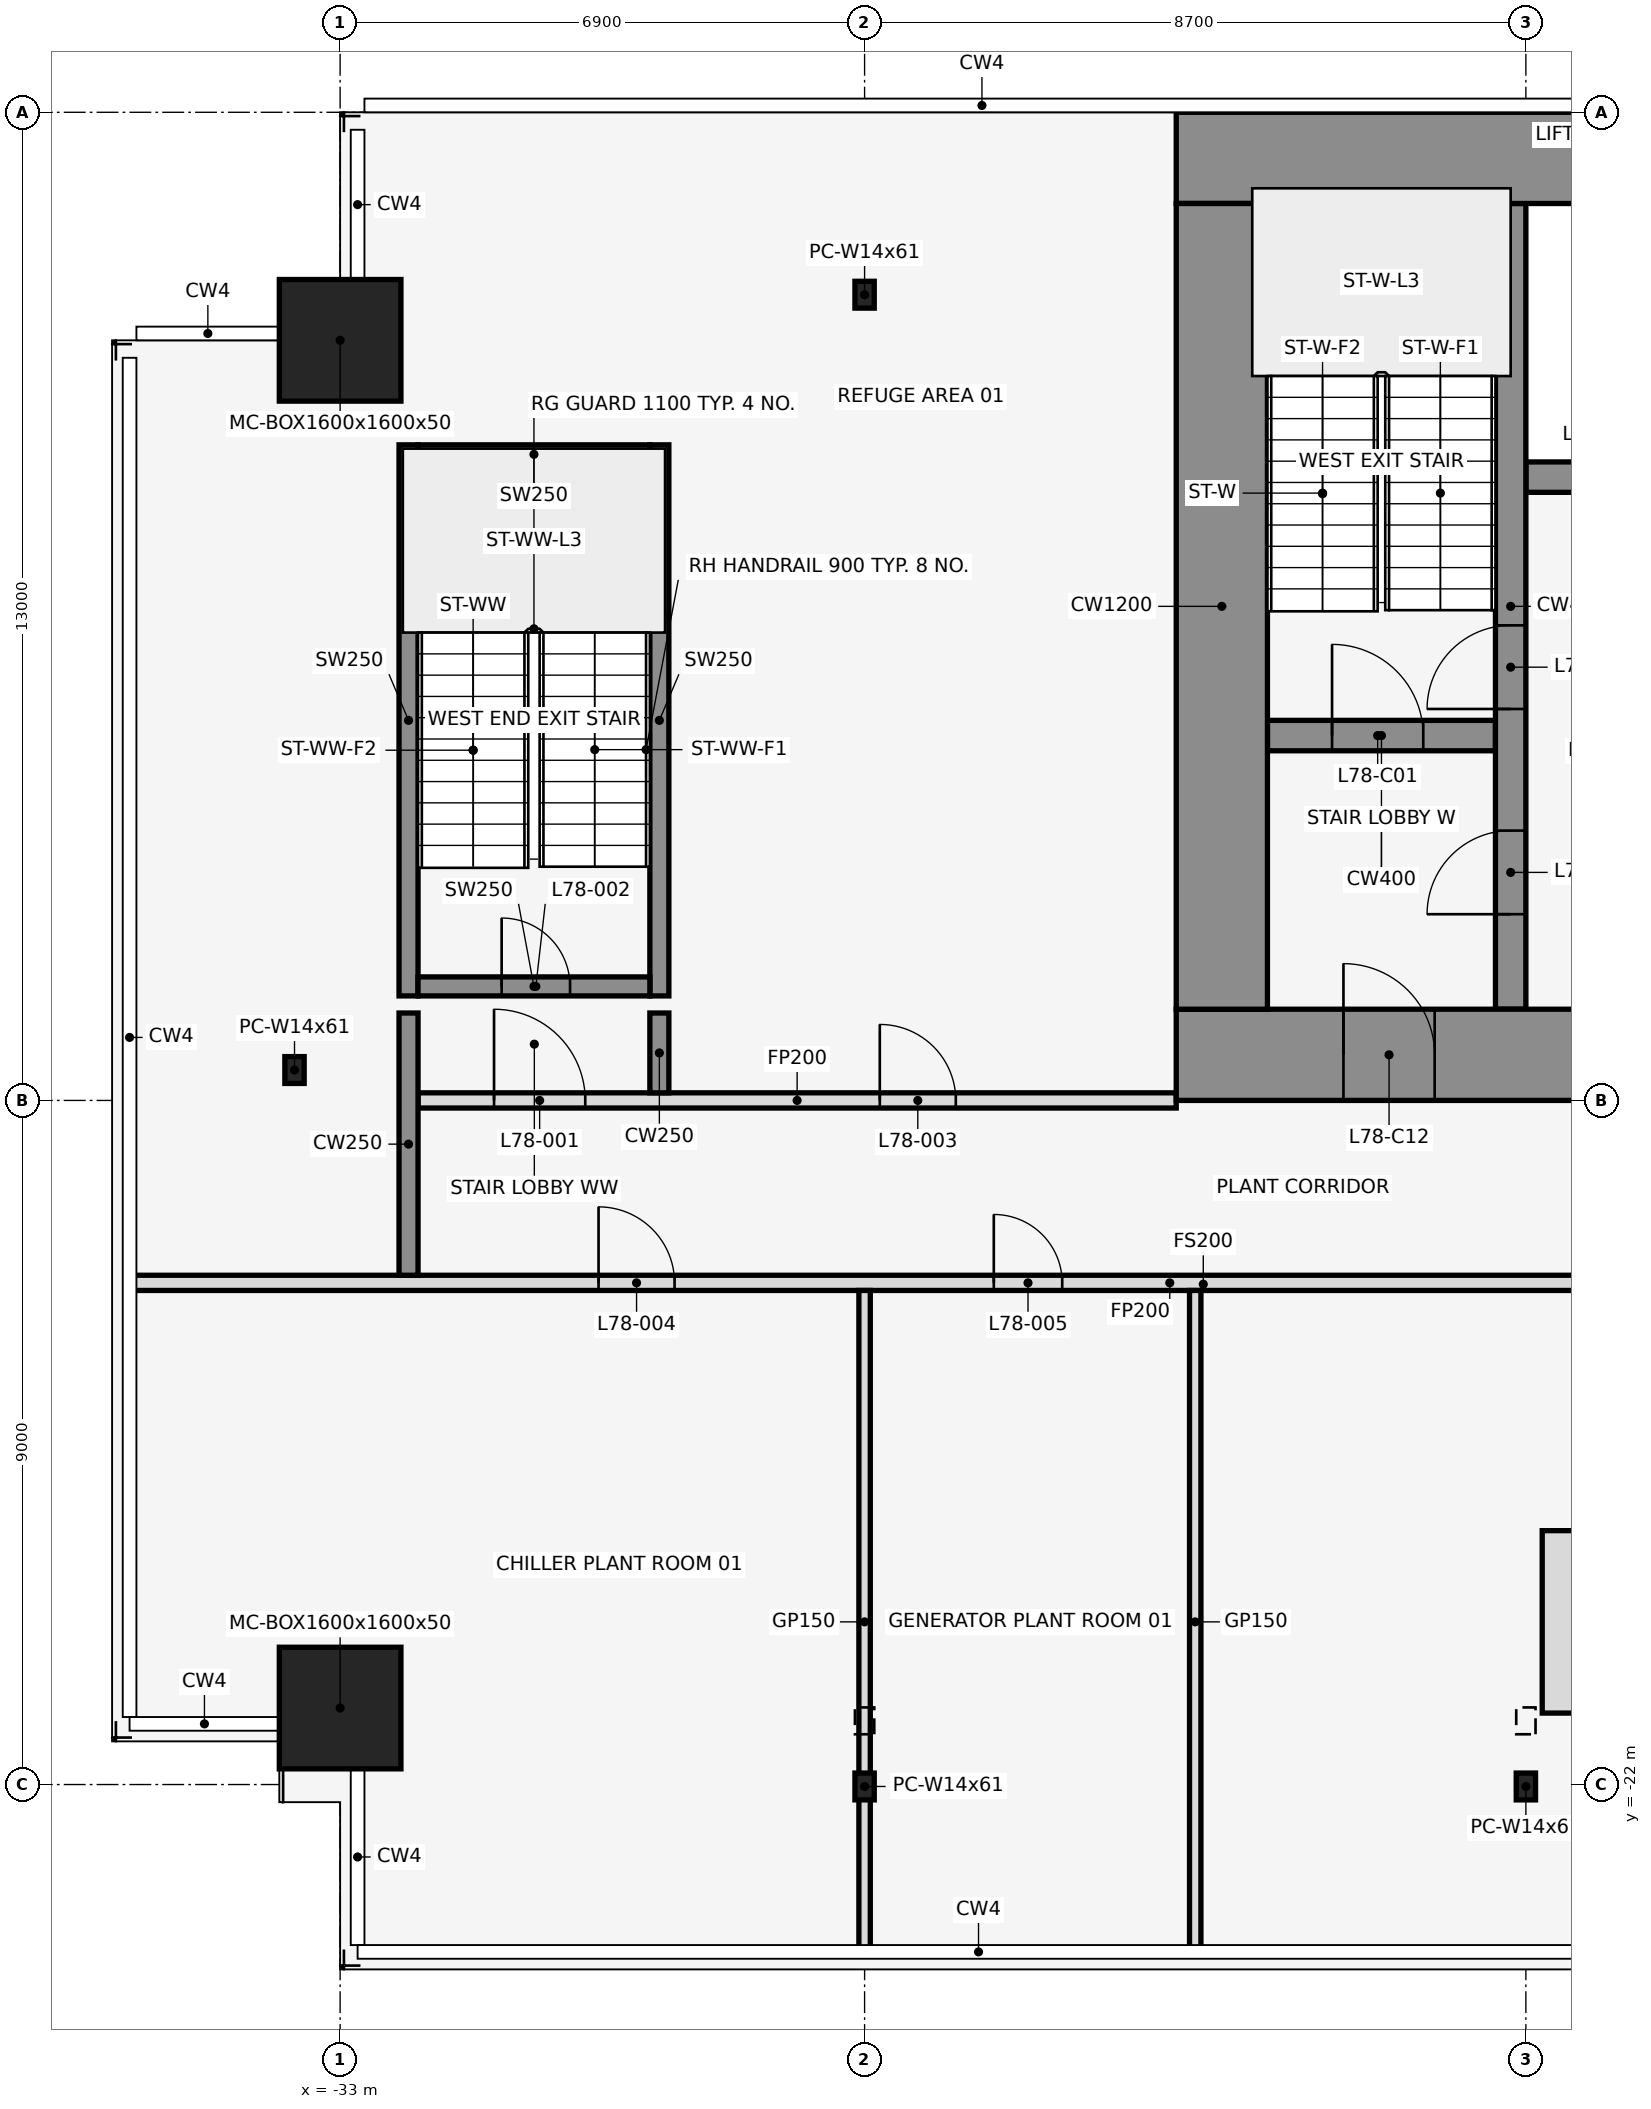
"""IFC4 building model, lengths in metres.
Left out: names, types, materials, properties, quantities, classifications, styles, units other than length and angle.
Written with IfcOpenShell. Run it as: python <this file> out.ifc"""

import sys

from ifc_helpers import new_model, si_unit, direction, frame, frame_2d, origin, origin_2d, place, context, subcontext, project, spatial, rectangle, hollow_rectangle, i_section, extrude, element, fill, save


model = new_model("IFC4")
c1 = context("Model", 3, precision=1e-05, world=origin(), true_north=direction((0.0, 1.0)))
c2 = subcontext(c1, "Body", "Model", "MODEL_VIEW")
j1 = project(units=[si_unit("LENGTHUNIT", "METRE"), si_unit("PLANEANGLEUNIT", "RADIAN")], contexts=[c1])
p1 = place(None, origin())
s1 = spatial("IfcSite", under=j1, at=p1, CompositionType="ELEMENT")
p2 = place(p1, origin())
s2 = spatial("IfcBuilding", under=s1, at=p2, CompositionType="ELEMENT")
p3 = place(p2, frame((0.0, 0.0, 347.9)))
s3 = spatial("IfcBuildingStorey", under=s2, at=p3, CompositionType="ELEMENT", Elevation=347.9)
for number, where, z_axis, x_axis in (
    (1, (-33.0, -20.994, 0.0), (0.0, 0.0, 1.0), (1.0, 0.0, 0.0)),
    (2, (-33.0, -3.0, 0.0), (0.0, 0.0, 1.0), (1.0, 0.0, 0.0)),
):
    element("IfcColumn", number, at=place(p3, frame(where, z_axis=z_axis, x_axis=x_axis)), inside=s3, PredefinedType="COLUMN", context=c2, shape_type="SweptSolid", body=[
        extrude(hollow_rectangle(XDim=1.6, YDim=1.6, WallThickness=0.05, at=origin_2d()), origin(), (0.0, 0.0, 1.0), 4.5),
    ])
p4 = place(p3, frame((-26.1, -22.025, 0.034), z_axis=(0.0, 0.191154699822, 0.981559922132), x_axis=(-1.0, 0.0, 0.0)))
e3 = element("IfcColumn", 3, at=p4, inside=s3, PredefinedType="COLUMN", context=c2, shape_type="SweptSolid", body=[
    extrude(i_section(OverallWidth=0.254, OverallDepth=0.353, WebThickness=0.01, FlangeThickness=0.016, at=origin_2d()), origin(), (0.0, 0.0, 1.0), 4.516),
])
p5 = place(p3, frame((-26.1, -2.4, 0.0), z_axis=(0.0, 0.0, 1.0), x_axis=(1.0, 0.0, 0.0)))
e4 = element("IfcColumn", 4, at=p5, inside=s3, PredefinedType="COLUMN", context=c2, shape_type="SweptSolid", body=[
    extrude(i_section(OverallWidth=0.254, OverallDepth=0.353, WebThickness=0.01, FlangeThickness=0.016, at=origin_2d()), origin(), (0.0, 0.0, 1.0), 4.5),
])
p6 = place(p3, frame((-17.4, -22.025, 0.034), z_axis=(0.0, 0.191154699822, 0.981559922132), x_axis=(-1.0, 0.0, 0.0)))
e5 = element("IfcColumn", 5, at=p6, inside=s3, PredefinedType="COLUMN", context=c2, shape_type="SweptSolid", body=[
    extrude(i_section(OverallWidth=0.254, OverallDepth=0.353, WebThickness=0.01, FlangeThickness=0.016, at=origin_2d()), origin(), (0.0, 0.0, 1.0), 4.516),
])
p7 = place(p3, frame((-33.6, -12.6, 0.0), z_axis=(0.0, 0.0, 1.0), x_axis=(1.0, 0.0, 0.0)))
e6 = element("IfcColumn", 6, at=p7, inside=s3, PredefinedType="COLUMN", context=c2, shape_type="SweptSolid", body=[
    extrude(i_section(OverallWidth=0.254, OverallDepth=0.353, WebThickness=0.01, FlangeThickness=0.016, at=origin_2d()), origin(), (0.0, 0.0, 1.0), 4.5),
])
p8 = place(p3, frame((-15.185, -19.86, 0.0), z_axis=(0.0, 0.0, 1.0), x_axis=(1.0, 0.0, 0.0)))
e7 = element("IfcWall", 7, at=p8, inside=s3, PredefinedType="USERDEFINED", context=c2, shape_type="SweptSolid", body=[
    extrude(rectangle(XDim=4.0, YDim=2.4, at=origin_2d()), origin(), (0.0, 0.0, 1.0), 0.2),
])
for number, where, z_axis, x_axis in (
    (8, (-32.1, -11.625, 0.0), (0.0, 0.0, 1.0), (0.0, 1.0, 0.0)),
    (9, (-28.8, -11.625, 0.0), (0.0, 0.0, 1.0), (0.0, 1.0, 0.0)),
):
    element("IfcWall", number, at=place(p3, frame(where, z_axis=z_axis, x_axis=x_axis)), inside=s3, PredefinedType="SHEAR", context=c2, shape_type="SweptSolid", body=[
        extrude(rectangle(XDim=7.25, YDim=0.25, at=frame_2d((3.625, 0.0))), origin(), (0.0, 0.0, 1.0), 4.5),
    ])
p9 = place(p3, frame((-31.975, -11.5, 0.0), z_axis=(0.0, 0.0, 1.0), x_axis=(1.0, 0.0, 0.0)))
e10 = element("IfcWall", 10, at=p9, inside=s3, PredefinedType="SHEAR", context=c2, shape_type="SweptSolid", body=[
    extrude(rectangle(XDim=3.05, YDim=0.25, at=frame_2d((1.525, 0.0))), origin(), (0.0, 0.0, 1.0), 4.5),
])
p10 = place(p9, frame((1.1, 0.0, 0.0)))
e11 = element("IfcOpeningElement", 11, at=p10, cuts=e10, PredefinedType="OPENING", context=c2, shape_type="SweptSolid", body=[
    extrude(rectangle(XDim=0.9, YDim=2.1, at=frame_2d((0.45, 1.05))), frame((0.0, 0.137, 0.0), z_axis=(0.0, -1.0, 0.0), x_axis=(1.0, 0.0, 0.0)), (0.0, 0.0, 1.0), 0.274),
])
p11 = place(p3, frame((-31.975, -4.5, 0.0), z_axis=(0.0, 0.0, 1.0), x_axis=(1.0, 0.0, 0.0)))
e12 = element("IfcWall", 12, at=p11, inside=s3, PredefinedType="SHEAR", context=c2, shape_type="SweptSolid", body=[
    extrude(rectangle(XDim=3.05, YDim=0.25, at=frame_2d((1.525, 0.0))), origin(), (0.0, 0.0, 1.0), 4.5),
])
p12 = place(p3, frame((-35.79, -15.4, 0.0), z_axis=(0.0, 0.0, 1.0), x_axis=(1.0, 0.0, 0.0)))
e13 = element("IfcWall", 13, at=p12, inside=s3, PredefinedType="PARTITIONING", context=c2, shape_type="SweptSolid", body=[
    extrude(rectangle(XDim=27.41, YDim=0.2, at=frame_2d((13.705, 0.0))), origin(), (0.0, 0.0, 1.0), 3.368),
])
p13 = place(p12, frame((6.19, 0.0, 0.0)))
e14 = element("IfcOpeningElement", 14, at=p13, cuts=e13, PredefinedType="OPENING", context=c2, shape_type="SweptSolid", body=[
    extrude(rectangle(XDim=1.0, YDim=2.1, at=frame_2d((0.5, 1.05))), frame((0.0, 0.112, 0.0), z_axis=(0.0, -1.0, 0.0), x_axis=(1.0, 0.0, 0.0)), (0.0, 0.0, 1.0), 0.224),
])
p14 = place(p12, frame((11.39, 0.0, 0.0)))
e15 = element("IfcOpeningElement", 15, at=p14, cuts=e13, PredefinedType="OPENING", context=c2, shape_type="SweptSolid", body=[
    extrude(rectangle(XDim=0.9, YDim=2.1, at=frame_2d((0.45, 1.05))), frame((0.0, 0.112, 0.0), z_axis=(0.0, -1.0, 0.0), x_axis=(1.0, 0.0, 0.0)), (0.0, 0.0, 1.0), 0.224),
])
p15 = place(p12, frame((20.04, 0.0, 0.0)))
e16 = element("IfcOpeningElement", 16, at=p15, cuts=e13, PredefinedType="OPENING", context=c2, shape_type="SweptSolid", body=[
    extrude(rectangle(XDim=1.0, YDim=2.1, at=frame_2d((0.5, 1.05))), frame((0.0, 0.112, 0.0), z_axis=(0.0, -1.0, 0.0), x_axis=(1.0, 0.0, 0.0)), (0.0, 0.0, 1.0), 0.224),
])
p16 = place(p3, frame((-31.975, -13.0, 0.0), z_axis=(0.0, 0.0, 1.0), x_axis=(1.0, 0.0, 0.0)))
e17 = element("IfcWall", 17, at=p16, inside=s3, PredefinedType="PARTITIONING", context=c2, shape_type="SweptSolid", body=[
    extrude(rectangle(XDim=9.975, YDim=0.2, at=frame_2d((4.988, 0.0))), origin(), (0.0, 0.0, 1.0), 3.368),
])
p17 = place(p16, frame((1.0, 0.0, 0.0)))
e18 = element("IfcOpeningElement", 18, at=p17, cuts=e17, PredefinedType="OPENING", context=c2, shape_type="SweptSolid", body=[
    extrude(rectangle(XDim=1.2, YDim=2.1, at=frame_2d((0.6, 1.05))), frame((0.0, 0.112, 0.0), z_axis=(0.0, -1.0, 0.0), x_axis=(1.0, 0.0, 0.0)), (0.0, 0.0, 1.0), 0.224),
])
p18 = place(p16, frame((6.075, 0.0, 0.0)))
e19 = element("IfcOpeningElement", 19, at=p18, cuts=e17, PredefinedType="OPENING", context=c2, shape_type="SweptSolid", body=[
    extrude(rectangle(XDim=1.0, YDim=2.1, at=frame_2d((0.5, 1.05))), frame((0.0, 0.112, 0.0), z_axis=(0.0, -1.0, 0.0), x_axis=(1.0, 0.0, 0.0)), (0.0, 0.0, 1.0), 0.224),
])
p19 = place(p3, frame((-32.1, -15.3, 0.0), z_axis=(0.0, 0.0, 1.0), x_axis=(0.0, 1.0, 0.0)))
e20 = element("IfcWall", 20, at=p19, inside=s3, PredefinedType="SHEAR", context=c2, shape_type="SweptSolid", body=[
    extrude(rectangle(XDim=3.45, YDim=0.25, at=frame_2d((1.725, 0.0))), origin(), (0.0, 0.0, 1.0), 4.5),
])
p20 = place(p3, frame((-28.8, -12.9, 0.0), z_axis=(0.0, 0.0, 1.0), x_axis=(0.0, 1.0, 0.0)))
e21 = element("IfcWall", 21, at=p20, inside=s3, PredefinedType="SHEAR", context=c2, shape_type="SweptSolid", body=[
    extrude(rectangle(XDim=1.05, YDim=0.25, at=frame_2d((0.525, 0.0))), origin(), (0.0, 0.0, 1.0), 4.5),
])
for number, where, z_axis, x_axis in (
    (22, (-26.1, -24.22, 0.0), (0.0, 0.0, 1.0), (0.0, 1.0, 0.0)),
    (23, (-21.75, -24.22, 0.0), (0.0, 0.0, 1.0), (0.0, 1.0, 0.0)),
):
    element("IfcWall", number, at=place(p3, frame(where, z_axis=z_axis, x_axis=x_axis)), inside=s3, PredefinedType="PARTITIONING", context=c2, shape_type="SweptSolid", body=[
        extrude(rectangle(XDim=8.72, YDim=0.15, at=frame_2d((4.36, 0.0))), origin(), (0.0, 0.0, 1.0), 3.368),
    ])
p21 = place(p3, frame((-20.8, -8.2, 0.0), z_axis=(0.0, 0.0, 1.0), x_axis=(1.0, 0.0, 0.0)))
e24 = element("IfcWall", 24, at=p21, inside=s3, PredefinedType="SHEAR", context=c2, shape_type="SweptSolid", body=[
    extrude(rectangle(XDim=3.0, YDim=0.4, at=frame_2d((1.5, 0.0))), origin(), (0.0, 0.0, 1.0), 4.5),
])
p22 = place(p21, frame((0.85, 0.0, 0.0)))
e25 = element("IfcOpeningElement", 25, at=p22, cuts=e24, PredefinedType="OPENING", context=c2, shape_type="SweptSolid", body=[
    extrude(rectangle(XDim=1.2, YDim=2.1, at=frame_2d((0.6, 1.05))), frame((0.0, 0.212, 0.0), z_axis=(0.0, -1.0, 0.0), x_axis=(1.0, 0.0, 0.0)), (0.0, 0.0, 1.0), 0.424),
])
p23 = place(p3, frame((-17.4, -4.8, 0.0), z_axis=(0.0, 0.0, 1.0), x_axis=(1.0, 0.0, 0.0)))
e26 = element("IfcWall", 26, at=p23, inside=s3, PredefinedType="SHEAR", context=c2, shape_type="SweptSolid", body=[
    extrude(rectangle(XDim=4.6, YDim=0.4, at=frame_2d((2.3, 0.0))), origin(), (0.0, 0.0, 1.0), 4.5),
])
p24 = place(p23, frame((0.65, 0.0, 0.0)))
e27 = element("IfcOpeningElement", 27, at=p24, cuts=e26, PredefinedType="OPENING", context=c2, shape_type="SweptSolid", body=[
    extrude(rectangle(XDim=1.1, YDim=2.1, at=frame_2d((0.55, 1.05))), frame((0.0, 0.212, 0.0), z_axis=(0.0, -1.0, 0.0), x_axis=(1.0, 0.0, 0.0)), (0.0, 0.0, 1.0), 0.424),
])
p25 = place(p23, frame((2.85, 0.0, 0.0)))
e28 = element("IfcOpeningElement", 28, at=p25, cuts=e26, PredefinedType="OPENING", context=c2, shape_type="SweptSolid", body=[
    extrude(rectangle(XDim=1.1, YDim=2.1, at=frame_2d((0.55, 1.05))), frame((0.0, 0.212, 0.0), z_axis=(0.0, -1.0, 0.0), x_axis=(1.0, 0.0, 0.0)), (0.0, 0.0, 1.0), 0.424),
])
p26 = place(p3, frame((-17.6, -11.8, 0.0), z_axis=(0.0, 0.0, 1.0), x_axis=(0.0, 1.0, 0.0)))
e29 = element("IfcWall", 29, at=p26, inside=s3, PredefinedType="SHEAR", context=c2, shape_type="SweptSolid", body=[
    extrude(rectangle(XDim=10.6, YDim=0.4, at=frame_2d((5.3, 0.0))), origin(), (0.0, 0.0, 1.0), 4.5),
])
p27 = place(p26, frame((1.25, 0.0, 0.0)))
e30 = element("IfcOpeningElement", 30, at=p27, cuts=e29, PredefinedType="OPENING", context=c2, shape_type="SweptSolid", body=[
    extrude(rectangle(XDim=1.1, YDim=2.1, at=frame_2d((0.55, 1.05))), frame((0.0, 0.212, 0.0), z_axis=(0.0, -1.0, 0.0), x_axis=(1.0, 0.0, 0.0)), (0.0, 0.0, 1.0), 0.424),
])
p28 = place(p26, frame((3.95, 0.0, 0.0)))
e31 = element("IfcOpeningElement", 31, at=p28, cuts=e29, PredefinedType="OPENING", context=c2, shape_type="SweptSolid", body=[
    extrude(rectangle(XDim=1.1, YDim=2.1, at=frame_2d((0.55, 1.05))), frame((0.0, 0.212, 0.0), z_axis=(0.0, -1.0, 0.0), x_axis=(1.0, 0.0, 0.0)), (0.0, 0.0, 1.0), 0.424),
])
p29 = place(p3, frame((-22.0, -0.6, 0.0), z_axis=(0.0, 0.0, 1.0), x_axis=(1.0, 0.0, 0.0)))
e32 = element("IfcWall", 32, at=p29, inside=s3, PredefinedType="SHEAR", context=c2, shape_type="SweptSolid", body=[
    extrude(rectangle(XDim=13.7, YDim=1.2, at=frame_2d((6.85, 0.0))), origin(), (0.0, 0.0, 1.0), 4.5),
])
p30 = place(p3, frame((-22.0, -12.4, 0.0), z_axis=(0.0, 0.0, 1.0), x_axis=(1.0, 0.0, 0.0)))
e33 = element("IfcWall", 33, at=p30, inside=s3, PredefinedType="SHEAR", context=c2, shape_type="SweptSolid", body=[
    extrude(rectangle(XDim=13.7, YDim=1.2, at=frame_2d((6.85, 0.0))), origin(), (0.0, 0.0, 1.0), 4.5),
])
p31 = place(p30, frame((2.2, 0.0, 0.0)))
e34 = element("IfcOpeningElement", 34, at=p31, cuts=e33, PredefinedType="OPENING", context=c2, shape_type="SweptSolid", body=[
    extrude(rectangle(XDim=1.2, YDim=2.1, at=frame_2d((0.6, 1.05))), frame((0.0, 0.612, 0.0), z_axis=(0.0, -1.0, 0.0), x_axis=(1.0, 0.0, 0.0)), (0.0, 0.0, 1.0), 1.224),
])
p32 = place(p30, frame((10.75, 0.0, 0.0)))
e35 = element("IfcOpeningElement", 35, at=p32, cuts=e33, PredefinedType="OPENING", context=c2, shape_type="SweptSolid", body=[
    extrude(rectangle(XDim=1.2, YDim=2.1, at=frame_2d((0.6, 1.05))), frame((0.0, 0.612, 0.0), z_axis=(0.0, -1.0, 0.0), x_axis=(1.0, 0.0, 0.0)), (0.0, 0.0, 1.0), 1.224),
])
p33 = place(p30, frame((6.3, 0.0, 0.0)))
e36 = element("IfcOpeningElement", 36, at=p33, cuts=e33, PredefinedType="OPENING", context=c2, shape_type="SweptSolid", body=[
    extrude(rectangle(XDim=1.2, YDim=2.1, at=frame_2d((0.6, 1.05))), frame((0.0, 0.612, 0.0), z_axis=(0.0, -1.0, 0.0), x_axis=(1.0, 0.0, 0.0)), (0.0, 0.0, 1.0), 1.224),
])
p34 = place(p3, frame((-21.4, -11.8, 0.0), z_axis=(0.0, 0.0, 1.0), x_axis=(0.0, 1.0, 0.0)))
e37 = element("IfcWall", 37, at=p34, inside=s3, PredefinedType="SHEAR", context=c2, shape_type="SweptSolid", body=[
    extrude(rectangle(XDim=10.6, YDim=1.2, at=frame_2d((5.3, 0.0))), origin(), (0.0, 0.0, 1.0), 4.5),
])
p35 = place(p17, origin())
e38 = element("IfcDoor", 38, at=p35, inside=s3, OperationType="SINGLE_SWING_LEFT", PredefinedType="DOOR", context=c2, shape_type="SweptSolid", body=[
    extrude(rectangle(XDim=1.2, YDim=2.1, at=frame_2d((0.6, 1.05))), frame((0.0, 0.025, 0.0), z_axis=(0.0, -1.0, 0.0), x_axis=(1.0, 0.0, 0.0)), (0.0, 0.0, 1.0), 0.05),
])
fill(e18, e38)
p36 = place(p10, origin())
e39 = element("IfcDoor", 39, at=p36, inside=s3, OperationType="SINGLE_SWING_LEFT", PredefinedType="DOOR", context=c2, shape_type="SweptSolid", body=[
    extrude(rectangle(XDim=0.9, YDim=2.1, at=frame_2d((0.45, 1.05))), frame((0.0, 0.025, 0.0), z_axis=(0.0, -1.0, 0.0), x_axis=(1.0, 0.0, 0.0)), (0.0, 0.0, 1.0), 0.05),
])
fill(e11, e39)
p37 = place(p18, origin())
e40 = element("IfcDoor", 40, at=p37, inside=s3, OperationType="SINGLE_SWING_RIGHT", PredefinedType="DOOR", context=c2, shape_type="SweptSolid", body=[
    extrude(rectangle(XDim=1.0, YDim=2.1, at=frame_2d((0.5, 1.05))), frame((0.0, 0.025, 0.0), z_axis=(0.0, -1.0, 0.0), x_axis=(1.0, 0.0, 0.0)), (0.0, 0.0, 1.0), 0.05),
])
fill(e19, e40)
p38 = place(p13, frame((1.0, 0.0, 0.0), z_axis=(0.0, 0.0, 1.0), x_axis=(-1.0, 0.0, 0.0)))
e41 = element("IfcDoor", 41, at=p38, inside=s3, OperationType="SINGLE_SWING_LEFT", PredefinedType="DOOR", context=c2, shape_type="SweptSolid", body=[
    extrude(rectangle(XDim=1.0, YDim=2.1, at=frame_2d((0.5, 1.05))), frame((0.0, 0.025, 0.0), z_axis=(0.0, -1.0, 0.0), x_axis=(1.0, 0.0, 0.0)), (0.0, 0.0, 1.0), 0.05),
])
fill(e14, e41)
p39 = place(p14, frame((0.9, 0.0, 0.0), z_axis=(0.0, 0.0, 1.0), x_axis=(-1.0, 0.0, 0.0)))
e42 = element("IfcDoor", 42, at=p39, inside=s3, OperationType="SINGLE_SWING_RIGHT", PredefinedType="DOOR", context=c2, shape_type="SweptSolid", body=[
    extrude(rectangle(XDim=0.9, YDim=2.1, at=frame_2d((0.45, 1.05))), frame((0.0, 0.025, 0.0), z_axis=(0.0, -1.0, 0.0), x_axis=(1.0, 0.0, 0.0)), (0.0, 0.0, 1.0), 0.05),
])
fill(e15, e42)
p40 = place(p22, origin())
e43 = element("IfcDoor", 43, at=p40, inside=s3, OperationType="SINGLE_SWING_LEFT", PredefinedType="DOOR", context=c2, shape_type="SweptSolid", body=[
    extrude(rectangle(XDim=1.2, YDim=2.1, at=frame_2d((0.6, 1.05))), frame((0.0, 0.025, 0.0), z_axis=(0.0, -1.0, 0.0), x_axis=(1.0, 0.0, 0.0)), (0.0, 0.0, 1.0), 0.05),
])
fill(e25, e43)
p41 = place(p27, frame((1.1, 0.0, 0.0), z_axis=(0.0, 0.0, 1.0), x_axis=(-1.0, 0.0, 0.0)))
e44 = element("IfcDoor", 44, at=p41, inside=s3, OperationType="SINGLE_SWING_LEFT", PredefinedType="DOOR", context=c2, shape_type="SweptSolid", body=[
    extrude(rectangle(XDim=1.1, YDim=2.1, at=frame_2d((0.55, 1.05))), frame((0.0, 0.025, 0.0), z_axis=(0.0, -1.0, 0.0), x_axis=(1.0, 0.0, 0.0)), (0.0, 0.0, 1.0), 0.05),
])
fill(e30, e44)
p42 = place(p28, frame((1.1, 0.0, 0.0), z_axis=(0.0, 0.0, 1.0), x_axis=(-1.0, 0.0, 0.0)))
e45 = element("IfcDoor", 45, at=p42, inside=s3, OperationType="SINGLE_SWING_RIGHT", PredefinedType="DOOR", context=c2, shape_type="SweptSolid", body=[
    extrude(rectangle(XDim=1.1, YDim=2.1, at=frame_2d((0.55, 1.05))), frame((0.0, 0.025, 0.0), z_axis=(0.0, -1.0, 0.0), x_axis=(1.0, 0.0, 0.0)), (0.0, 0.0, 1.0), 0.05),
])
fill(e31, e45)
p43 = place(p31, frame((1.2, 0.0, 0.0), z_axis=(0.0, 0.0, 1.0), x_axis=(-1.0, 0.0, 0.0)))
e46 = element("IfcDoor", 46, at=p43, inside=s3, OperationType="SINGLE_SWING_RIGHT", PredefinedType="DOOR", context=c2, shape_type="SweptSolid", body=[
    extrude(rectangle(XDim=1.2, YDim=2.1, at=frame_2d((0.6, 1.05))), frame((0.0, 0.025, 0.0), z_axis=(0.0, -1.0, 0.0), x_axis=(1.0, 0.0, 0.0)), (0.0, 0.0, 1.0), 0.05),
])
fill(e34, e46)
save(model, sys.argv[1])
